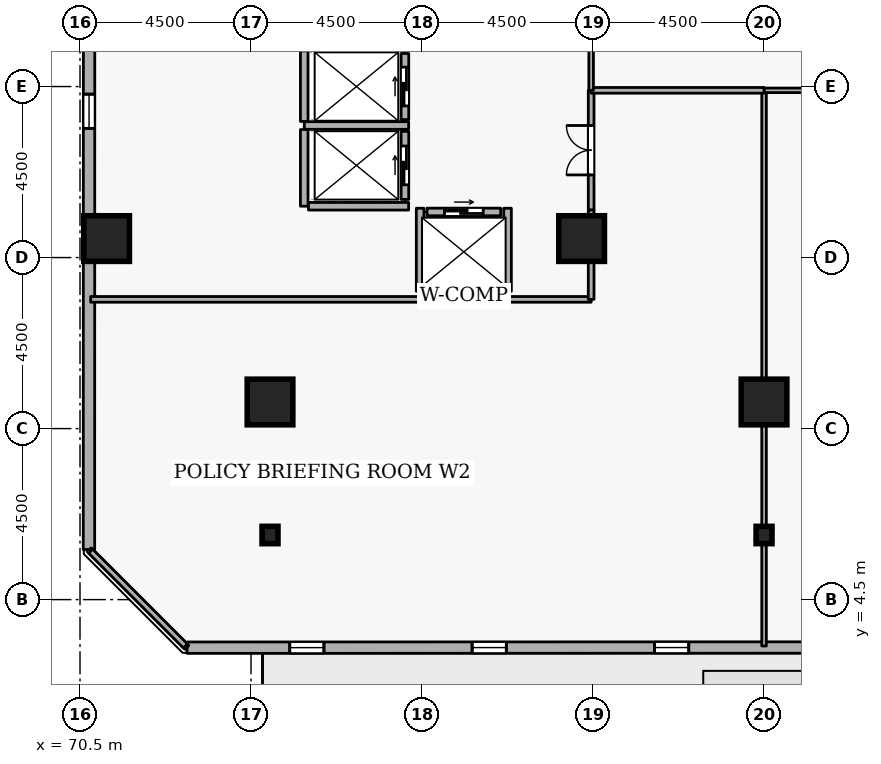
"""IFC4 building model, lengths in metres.
Left out: names, types, materials, properties, quantities, classifications, styles, units other than length and angle.
Written with IfcOpenShell. Run it as: python <this file> out.ifc"""

import sys

from ifc_helpers import new_model, si_unit, direction, frame, frame_2d, origin, origin_2d, place, context, subcontext, project, spatial, rectangle, i_section, extrude, element, fill, save


model = new_model("IFC4")
c1 = context("Model", 3, precision=1e-05, world=origin(), true_north=direction((0.0, 1.0)))
c2 = subcontext(c1, "Body", "Model", "MODEL_VIEW")
j1 = project(units=[si_unit("LENGTHUNIT", "METRE"), si_unit("PLANEANGLEUNIT", "RADIAN")], contexts=[c1])
p1 = place(None, origin())
s1 = spatial("IfcSite", under=j1, at=p1, CompositionType="ELEMENT")
p2 = place(p1, origin())
s2 = spatial("IfcBuilding", under=s1, at=p2, CompositionType="ELEMENT")
p3 = place(p2, frame((0.0, 0.0, 134.1)))
s3 = spatial("IfcBuildingStorey", under=s2, at=p3, CompositionType="ELEMENT", Elevation=134.1)
for number, where, z_axis, x_axis in (
    (1, (71.2, 14.0, 0.0), (0.0, 0.0, 1.0), (1.0, 0.0, 0.0)),
    (2, (88.5, 9.7, 0.0), (0.0, 0.0, 1.0), (1.0, 0.0, 0.0)),
    (3, (75.5, 9.7, 0.0), (0.0, 0.0, 1.0), (1.0, 0.0, 0.0)),
    (4, (83.7, 14.0, 0.0), (0.0, 0.0, 1.0), (1.0, 0.0, 0.0)),
):
    element("IfcColumn", number, at=place(p3, frame(where, z_axis=z_axis, x_axis=x_axis)), inside=s3, PredefinedType="COLUMN", context=c2, shape_type="SweptSolid", body=[
        extrude(rectangle(XDim=1.2, YDim=1.2, at=origin_2d()), origin(), (0.0, 0.0, 1.0), 3.6),
    ])
for number, where, z_axis, x_axis in (
    (5, (88.5, 6.2, 0.0), (0.0, 0.0, 1.0), (1.0, 0.0, 0.0)),
    (6, (75.5, 6.2, 0.0), (0.0, 0.0, 1.0), (1.0, 0.0, 0.0)),
):
    element("IfcColumn", number, at=place(p3, frame(where, z_axis=z_axis, x_axis=x_axis)), inside=s3, PredefinedType="COLUMN", context=c2, shape_type="SweptSolid", body=[
        extrude(i_section(OverallWidth=0.418, OverallDepth=0.456, WebThickness=0.042, FlangeThickness=0.067, FilletRadius=0.015, at=origin_2d()), origin(), (0.0, 0.0, 1.0), 3.6),
    ])
p4 = place(p3, frame((73.319, 3.235, 0.0), z_axis=(0.0, 0.0, 1.0), x_axis=(0.999999969988, 0.000244999128, 0.0)))
e7 = element("IfcWall", 7, at=p4, inside=s3, PredefinedType="STANDARD", context=c2, shape_type="SweptSolid", body=[
    extrude(rectangle(XDim=33.881, YDim=0.3, at=frame_2d((16.94, 0.0))), origin(), (0.0, 0.0, 1.0), 2.7),
])
p5 = place(p4, frame((18.74, 0.0, 0.0)))
e8 = element("IfcOpeningElement", 8, at=p5, cuts=e7, PredefinedType="OPENING", context=c2, shape_type="SweptSolid", body=[
    extrude(rectangle(XDim=1.0, YDim=2.08, at=frame_2d((0.5, 1.04))), frame((0.0, 0.16, 0.0), z_axis=(0.0, -1.0, 0.0), x_axis=(1.0, 0.0, 0.0)), (0.0, 0.0, 1.0), 0.32),
])
p6 = place(p4, frame((2.7, 0.0, 0.72)))
e9 = element("IfcOpeningElement", 9, at=p6, cuts=e7, PredefinedType="OPENING", context=c2, shape_type="SweptSolid", body=[
    extrude(rectangle(XDim=0.9, YDim=1.75, at=frame_2d((0.45, 0.875))), frame((0.0, 0.16, 0.0), z_axis=(0.0, -1.0, 0.0), x_axis=(1.0, 0.0, 0.0)), (0.0, 0.0, 1.0), 0.32),
])
p7 = place(p4, frame((7.5, 0.0, 0.72)))
e10 = element("IfcOpeningElement", 10, at=p7, cuts=e7, PredefinedType="OPENING", context=c2, shape_type="SweptSolid", body=[
    extrude(rectangle(XDim=0.9, YDim=1.75, at=frame_2d((0.45, 0.875))), frame((0.0, 0.16, 0.0), z_axis=(0.0, -1.0, 0.0), x_axis=(1.0, 0.0, 0.0)), (0.0, 0.0, 1.0), 0.32),
])
p8 = place(p4, frame((12.3, 0.0, 0.72)))
e11 = element("IfcOpeningElement", 11, at=p8, cuts=e7, PredefinedType="OPENING", context=c2, shape_type="SweptSolid", body=[
    extrude(rectangle(XDim=0.9, YDim=1.75, at=frame_2d((0.45, 0.875))), frame((0.0, 0.16, 0.0), z_axis=(0.0, -1.0, 0.0), x_axis=(1.0, 0.0, 0.0)), (0.0, 0.0, 1.0), 0.32),
])
p9 = place(p4, frame((21.9, 0.0, 0.72)))
e12 = element("IfcOpeningElement", 12, at=p9, cuts=e7, PredefinedType="OPENING", context=c2, shape_type="SweptSolid", body=[
    extrude(rectangle(XDim=0.9, YDim=1.75, at=frame_2d((0.45, 0.875))), frame((0.0, 0.16, 0.0), z_axis=(0.0, -1.0, 0.0), x_axis=(1.0, 0.0, 0.0)), (0.0, 0.0, 1.0), 0.32),
])
p10 = place(p4, frame((26.7, 0.0, 0.72)))
e13 = element("IfcOpeningElement", 13, at=p10, cuts=e7, PredefinedType="OPENING", context=c2, shape_type="SweptSolid", body=[
    extrude(rectangle(XDim=0.9, YDim=1.75, at=frame_2d((0.45, 0.875))), frame((0.0, 0.16, 0.0), z_axis=(0.0, -1.0, 0.0), x_axis=(1.0, 0.0, 0.0)), (0.0, 0.0, 1.0), 0.32),
])
p11 = place(p3, frame((70.744, 39.699, 0.0), z_axis=(0.0, 0.0, 1.0), x_axis=(-0.000244999128, -0.999999969988, 0.0)))
e14 = element("IfcWall", 14, at=p11, inside=s3, PredefinedType="STANDARD", context=c2, shape_type="SweptSolid", body=[
    extrude(rectangle(XDim=33.881, YDim=0.3, at=frame_2d((16.94, 0.0))), origin(), (0.0, 0.0, 1.0), 2.7),
])
p12 = place(p11, frame((2.7, 0.0, 0.72)))
e15 = element("IfcOpeningElement", 15, at=p12, cuts=e14, PredefinedType="OPENING", context=c2, shape_type="SweptSolid", body=[
    extrude(rectangle(XDim=0.9, YDim=1.75, at=frame_2d((0.45, 0.875))), frame((0.0, 0.16, 0.0), z_axis=(0.0, -1.0, 0.0), x_axis=(1.0, 0.0, 0.0)), (0.0, 0.0, 1.0), 0.32),
])
p13 = place(p11, frame((7.5, 0.0, 0.72)))
e16 = element("IfcOpeningElement", 16, at=p13, cuts=e14, PredefinedType="OPENING", context=c2, shape_type="SweptSolid", body=[
    extrude(rectangle(XDim=0.9, YDim=1.75, at=frame_2d((0.45, 0.875))), frame((0.0, 0.16, 0.0), z_axis=(0.0, -1.0, 0.0), x_axis=(1.0, 0.0, 0.0)), (0.0, 0.0, 1.0), 0.32),
])
p14 = place(p11, frame((17.1, 0.0, 0.72)))
e17 = element("IfcOpeningElement", 17, at=p14, cuts=e14, PredefinedType="OPENING", context=c2, shape_type="SweptSolid", body=[
    extrude(rectangle(XDim=0.9, YDim=1.75, at=frame_2d((0.45, 0.875))), frame((0.0, 0.16, 0.0), z_axis=(0.0, -1.0, 0.0), x_axis=(1.0, 0.0, 0.0)), (0.0, 0.0, 1.0), 0.32),
])
p15 = place(p11, frame((21.9, 0.0, 0.72)))
e18 = element("IfcOpeningElement", 18, at=p15, cuts=e14, PredefinedType="OPENING", context=c2, shape_type="SweptSolid", body=[
    extrude(rectangle(XDim=0.9, YDim=1.75, at=frame_2d((0.45, 0.875))), frame((0.0, 0.16, 0.0), z_axis=(0.0, -1.0, 0.0), x_axis=(1.0, 0.0, 0.0)), (0.0, 0.0, 1.0), 0.32),
])
p16 = place(p3, frame((79.05, 17.13, 0.0), z_axis=(0.0, 0.0, 1.0), x_axis=(0.0, 1.0, 0.0)))
e19 = element("IfcWall", 19, at=p16, inside=s3, PredefinedType="STANDARD", context=c2, shape_type="SweptSolid", body=[
    extrude(rectangle(XDim=1.74, YDim=0.2, at=frame_2d((0.87, 0.0))), origin(), (0.0, 0.0, 1.0), 3.34),
])
p17 = place(p16, frame((0.36, 0.0, 0.0)))
e20 = element("IfcOpeningElement", 20, at=p17, cuts=e19, PredefinedType="OPENING", context=c2, shape_type="SweptSolid", body=[
    extrude(rectangle(XDim=1.02, YDim=2.06, at=frame_2d((0.51, 1.03))), frame((0.0, 0.11, 0.0), z_axis=(0.0, -1.0, 0.0), x_axis=(1.0, 0.0, 0.0)), (0.0, 0.0, 1.0), 0.22),
])
p18 = place(p3, frame((79.05, 15.03, 0.0), z_axis=(0.0, 0.0, 1.0), x_axis=(0.0, 1.0, 0.0)))
e21 = element("IfcWall", 21, at=p18, inside=s3, PredefinedType="STANDARD", context=c2, shape_type="SweptSolid", body=[
    extrude(rectangle(XDim=1.79, YDim=0.2, at=frame_2d((0.895, 0.0))), origin(), (0.0, 0.0, 1.0), 3.34),
])
p19 = place(p18, frame((0.385, 0.0, 0.0)))
e22 = element("IfcOpeningElement", 22, at=p19, cuts=e21, PredefinedType="OPENING", context=c2, shape_type="SweptSolid", body=[
    extrude(rectangle(XDim=1.02, YDim=2.06, at=frame_2d((0.51, 1.03))), frame((0.0, 0.11, 0.0), z_axis=(0.0, -1.0, 0.0), x_axis=(1.0, 0.0, 0.0)), (0.0, 0.0, 1.0), 0.22),
])
p20 = place(p3, frame((79.63, 14.7, 0.0), z_axis=(0.0, 0.0, 1.0), x_axis=(1.0, 0.0, 0.0)))
e23 = element("IfcWall", 23, at=p20, inside=s3, PredefinedType="STANDARD", context=c2, shape_type="SweptSolid", body=[
    extrude(rectangle(XDim=1.94, YDim=0.2, at=frame_2d((0.97, 0.0))), origin(), (0.0, 0.0, 1.0), 3.34),
])
p21 = place(p20, frame((0.46, 0.0, 0.0)))
e24 = element("IfcOpeningElement", 24, at=p21, cuts=e23, PredefinedType="OPENING", context=c2, shape_type="SweptSolid", body=[
    extrude(rectangle(XDim=1.02, YDim=2.06, at=frame_2d((0.51, 1.03))), frame((0.0, 0.11, 0.0), z_axis=(0.0, -1.0, 0.0), x_axis=(1.0, 0.0, 0.0)), (0.0, 0.0, 1.0), 0.22),
])
p22 = place(p3, frame((76.402, 16.975, 0.0), z_axis=(0.0, 0.0, 1.0), x_axis=(1.0, 0.0, 0.0)))
e25 = element("IfcWall", 25, at=p22, inside=s3, PredefinedType="STANDARD", context=c2, shape_type="SweptSolid", body=[
    extrude(rectangle(XDim=2.746, YDim=0.2, at=frame_2d((1.373, 0.0))), origin(), (0.0, 0.0, 1.0), 3.34),
])
p23 = place(p3, frame((76.4, 14.852, 0.0), z_axis=(0.0, 0.0, 1.0), x_axis=(0.0, 1.0, 0.0)))
e26 = element("IfcWall", 26, at=p23, inside=s3, PredefinedType="STANDARD", context=c2, shape_type="SweptSolid", body=[
    extrude(rectangle(XDim=2.016, YDim=0.2, at=frame_2d((1.008, 0.0))), origin(), (0.0, 0.0, 1.0), 3.34),
])
p24 = place(p3, frame((76.4, 17.082, 0.0), z_axis=(0.0, 0.0, 1.0), x_axis=(0.0, 1.0, 0.0)))
e27 = element("IfcWall", 27, at=p24, inside=s3, PredefinedType="STANDARD", context=c2, shape_type="SweptSolid", body=[
    extrude(rectangle(XDim=1.856, YDim=0.2, at=frame_2d((0.928, 0.0))), origin(), (0.0, 0.0, 1.0), 3.34),
])
p25 = place(p3, frame((76.512, 14.85, 0.0), z_axis=(0.0, 0.0, 1.0), x_axis=(1.0, 0.0, 0.0)))
e28 = element("IfcWall", 28, at=p25, inside=s3, PredefinedType="STANDARD", context=c2, shape_type="SweptSolid", body=[
    extrude(rectangle(XDim=2.636, YDim=0.2, at=frame_2d((1.318, 0.0))), origin(), (0.0, 0.0, 1.0), 3.34),
])
p26 = place(p3, frame((79.452, 12.5, 0.0), z_axis=(0.0, 0.0, 1.0), x_axis=(1.0, 0.0, 0.0)))
e29 = element("IfcWall", 29, at=p26, inside=s3, PredefinedType="STANDARD", context=c2, shape_type="SweptSolid", body=[
    extrude(rectangle(XDim=2.296, YDim=0.2, at=frame_2d((1.148, 0.0))), origin(), (0.0, 0.0, 1.0), 3.34),
])
for number, where, z_axis, x_axis in (
    (30, (81.75, 12.612, 0.0), (0.0, 0.0, 1.0), (0.0, 1.0, 0.0)),
    (31, (79.45, 12.612, 0.0), (0.0, 0.0, 1.0), (0.0, 1.0, 0.0)),
):
    element("IfcWall", number, at=place(p3, frame(where, z_axis=z_axis, x_axis=x_axis)), inside=s3, PredefinedType="STANDARD", context=c2, shape_type="SweptSolid", body=[
        extrude(rectangle(XDim=2.186, YDim=0.2, at=frame_2d((1.093, 0.0))), origin(), (0.0, 0.0, 1.0), 3.34),
    ])
p27 = place(p3, frame((88.5, 3.28, 0.0), z_axis=(0.0, 0.0, 1.0), x_axis=(0.0, 1.0, 0.0)))
e32 = element("IfcWall", 32, at=p27, inside=s3, PredefinedType="PARTITIONING", context=c2, shape_type="SweptSolid", body=[
    extrude(rectangle(XDim=14.62, YDim=0.12, at=frame_2d((7.31, 0.0))), origin(), (0.0, 0.0, 1.0), 2.878),
])
p28 = place(p3, frame((88.5, 17.9, 0.0), z_axis=(0.0, 0.0, 1.0), x_axis=(1.0, 0.0, 0.0)))
e33 = element("IfcWall", 33, at=p28, inside=s3, PredefinedType="PARTITIONING", context=c2, shape_type="SweptSolid", body=[
    extrude(rectangle(XDim=4.55, YDim=0.12, at=frame_2d((2.275, 0.0))), origin(), (0.0, 0.0, 1.0), 3.34),
])
p29 = place(p3, frame((83.95, 14.75, 0.0), z_axis=(0.0, 0.0, 1.0), x_axis=(0.0, 1.0, 0.0)))
e34 = element("IfcWall", 34, at=p29, inside=s3, PredefinedType="PARTITIONING", context=c2, shape_type="SweptSolid", body=[
    extrude(rectangle(XDim=3.15, YDim=0.15, at=frame_2d((1.575, 0.0))), origin(), (0.0, 0.0, 1.0), 3.34),
])
p30 = place(p29, frame((0.925, 0.0, 0.0)))
e35 = element("IfcOpeningElement", 35, at=p30, cuts=e34, PredefinedType="OPENING", context=c2, shape_type="SweptSolid", body=[
    extrude(rectangle(XDim=1.3, YDim=2.12, at=frame_2d((0.65, 1.06))), frame((0.0, 0.085, 0.0), z_axis=(0.0, -1.0, 0.0), x_axis=(1.0, 0.0, 0.0)), (0.0, 0.0, 1.0), 0.17),
])
p31 = place(p3, frame((83.95, 17.9, 0.0), z_axis=(0.0, 0.0, 1.0), x_axis=(1.0, 0.0, 0.0)))
e36 = element("IfcWall", 36, at=p31, inside=s3, PredefinedType="PARTITIONING", context=c2, shape_type="SweptSolid", body=[
    extrude(rectangle(XDim=4.55, YDim=0.15, at=frame_2d((2.275, 0.0))), origin(), (0.0, 0.0, 1.0), 3.34),
])
p32 = place(p3, frame((73.275, 3.28, 0.0), z_axis=(0.0, 0.0, 1.0), x_axis=(-0.707106781187, 0.707106781187, 0.0)))
e37 = element("IfcWall", 37, at=p32, inside=s3, PredefinedType="PARTITIONING", context=c2, shape_type="SweptSolid", body=[
    extrude(rectangle(XDim=3.528, YDim=0.15, at=frame_2d((1.764, 0.0))), origin(), (0.0, 0.0, 1.0), 3.34),
])
p33 = place(p3, frame((70.78, 12.4, 0.0), z_axis=(0.0, 0.0, 1.0), x_axis=(1.0, 0.0, 0.0)))
e38 = element("IfcWall", 38, at=p33, inside=s3, PredefinedType="PARTITIONING", context=c2, shape_type="SweptSolid", body=[
    extrude(rectangle(XDim=8.672, YDim=0.15, at=frame_2d((4.336, 0.0))), origin(), (0.0, 0.0, 1.0), 3.34),
])
p34 = place(p3, frame((81.748, 12.4, 0.0), z_axis=(0.0, 0.0, 1.0), x_axis=(1.0, 0.0, 0.0)))
e39 = element("IfcWall", 39, at=p34, inside=s3, PredefinedType="PARTITIONING", context=c2, shape_type="SweptSolid", body=[
    extrude(rectangle(XDim=2.202, YDim=0.15, at=frame_2d((1.101, 0.0))), origin(), (0.0, 0.0, 1.0), 3.34),
])
p35 = place(p3, frame((83.95, 12.4, 0.0), z_axis=(0.0, 0.0, 1.0), x_axis=(0.0, 1.0, 0.0)))
e40 = element("IfcWall", 40, at=p35, inside=s3, PredefinedType="PARTITIONING", context=c2, shape_type="SweptSolid", body=[
    extrude(rectangle(XDim=2.35, YDim=0.15, at=frame_2d((1.175, 0.0))), origin(), (0.0, 0.0, 1.0), 3.34),
])
p36 = place(p3, frame((83.95, 17.9, 0.0), z_axis=(0.0, 0.0, 1.0), x_axis=(0.0, 1.0, 0.0)))
e41 = element("IfcWall", 41, at=p36, inside=s3, PredefinedType="PARTITIONING", context=c2, shape_type="SweptSolid", body=[
    extrude(rectangle(XDim=4.5, YDim=0.12, at=frame_2d((2.25, 0.0))), origin(), (0.0, 0.0, 1.0), 3.34),
])
p37 = place(p36, frame((1.775, 0.0, 0.0)))
e42 = element("IfcOpeningElement", 42, at=p37, cuts=e41, PredefinedType="OPENING", context=c2, shape_type="SweptSolid", body=[
    extrude(rectangle(XDim=0.95, YDim=2.1, at=frame_2d((0.475, 1.05))), frame((0.0, 0.07, 0.0), z_axis=(0.0, -1.0, 0.0), x_axis=(1.0, 0.0, 0.0)), (0.0, 0.0, 1.0), 0.14),
])
p38 = place(p6, origin())
e43 = element("IfcWindow", 43, at=p38, inside=s3, PartitioningType="SINGLE_PANEL", PredefinedType="WINDOW", context=c2, shape_type="SweptSolid", body=[
    extrude(rectangle(XDim=0.9, YDim=1.75, at=frame_2d((0.45, 0.875))), frame((0.0, 0.03, 0.0), z_axis=(0.0, -1.0, 0.0), x_axis=(1.0, 0.0, 0.0)), (0.0, 0.0, 1.0), 0.06),
])
fill(e9, e43)
p39 = place(p7, origin())
e44 = element("IfcWindow", 44, at=p39, inside=s3, PartitioningType="SINGLE_PANEL", PredefinedType="WINDOW", context=c2, shape_type="SweptSolid", body=[
    extrude(rectangle(XDim=0.9, YDim=1.75, at=frame_2d((0.45, 0.875))), frame((0.0, 0.03, 0.0), z_axis=(0.0, -1.0, 0.0), x_axis=(1.0, 0.0, 0.0)), (0.0, 0.0, 1.0), 0.06),
])
fill(e10, e44)
p40 = place(p8, origin())
e45 = element("IfcWindow", 45, at=p40, inside=s3, PartitioningType="SINGLE_PANEL", PredefinedType="WINDOW", context=c2, shape_type="SweptSolid", body=[
    extrude(rectangle(XDim=0.9, YDim=1.75, at=frame_2d((0.45, 0.875))), frame((0.0, 0.03, 0.0), z_axis=(0.0, -1.0, 0.0), x_axis=(1.0, 0.0, 0.0)), (0.0, 0.0, 1.0), 0.06),
])
fill(e11, e45)
p41 = place(p15, origin())
e46 = element("IfcWindow", 46, at=p41, inside=s3, PartitioningType="SINGLE_PANEL", PredefinedType="WINDOW", context=c2, shape_type="SweptSolid", body=[
    extrude(rectangle(XDim=0.9, YDim=1.75, at=frame_2d((0.45, 0.875))), frame((0.0, 0.03, 0.0), z_axis=(0.0, -1.0, 0.0), x_axis=(1.0, 0.0, 0.0)), (0.0, 0.0, 1.0), 0.06),
])
fill(e18, e46)
p42 = place(p17, origin())
e47 = element("IfcDoor", 47, at=p42, inside=s3, OperationType="SLIDING_TO_LEFT", PredefinedType="DOOR", context=c2, shape_type="SweptSolid", body=[
    extrude(rectangle(XDim=1.02, YDim=2.06, at=frame_2d((0.51, 1.03))), frame((0.0, 0.025, 0.0), z_axis=(0.0, -1.0, 0.0), x_axis=(1.0, 0.0, 0.0)), (0.0, 0.0, 1.0), 0.05),
])
fill(e20, e47)
p43 = place(p19, origin())
e48 = element("IfcDoor", 48, at=p43, inside=s3, OperationType="SLIDING_TO_LEFT", PredefinedType="DOOR", context=c2, shape_type="SweptSolid", body=[
    extrude(rectangle(XDim=1.02, YDim=2.06, at=frame_2d((0.51, 1.03))), frame((0.0, 0.025, 0.0), z_axis=(0.0, -1.0, 0.0), x_axis=(1.0, 0.0, 0.0)), (0.0, 0.0, 1.0), 0.05),
])
fill(e22, e48)
p44 = place(p21, origin())
e49 = element("IfcDoor", 49, at=p44, inside=s3, OperationType="SLIDING_TO_LEFT", PredefinedType="DOOR", context=c2, shape_type="SweptSolid", body=[
    extrude(rectangle(XDim=1.02, YDim=2.06, at=frame_2d((0.51, 1.03))), frame((0.0, 0.025, 0.0), z_axis=(0.0, -1.0, 0.0), x_axis=(1.0, 0.0, 0.0)), (0.0, 0.0, 1.0), 0.05),
])
fill(e24, e49)
p45 = place(p30, origin())
e50 = element("IfcDoor", 50, at=p45, inside=s3, OperationType="DOUBLE_DOOR_SINGLE_SWING", PredefinedType="DOOR", context=c2, shape_type="SweptSolid", body=[
    extrude(rectangle(XDim=1.3, YDim=2.12, at=frame_2d((0.65, 1.06))), frame((0.0, 0.025, 0.0), z_axis=(0.0, -1.0, 0.0), x_axis=(1.0, 0.0, 0.0)), (0.0, 0.0, 1.0), 0.05),
])
fill(e35, e50)
save(model, sys.argv[1])
